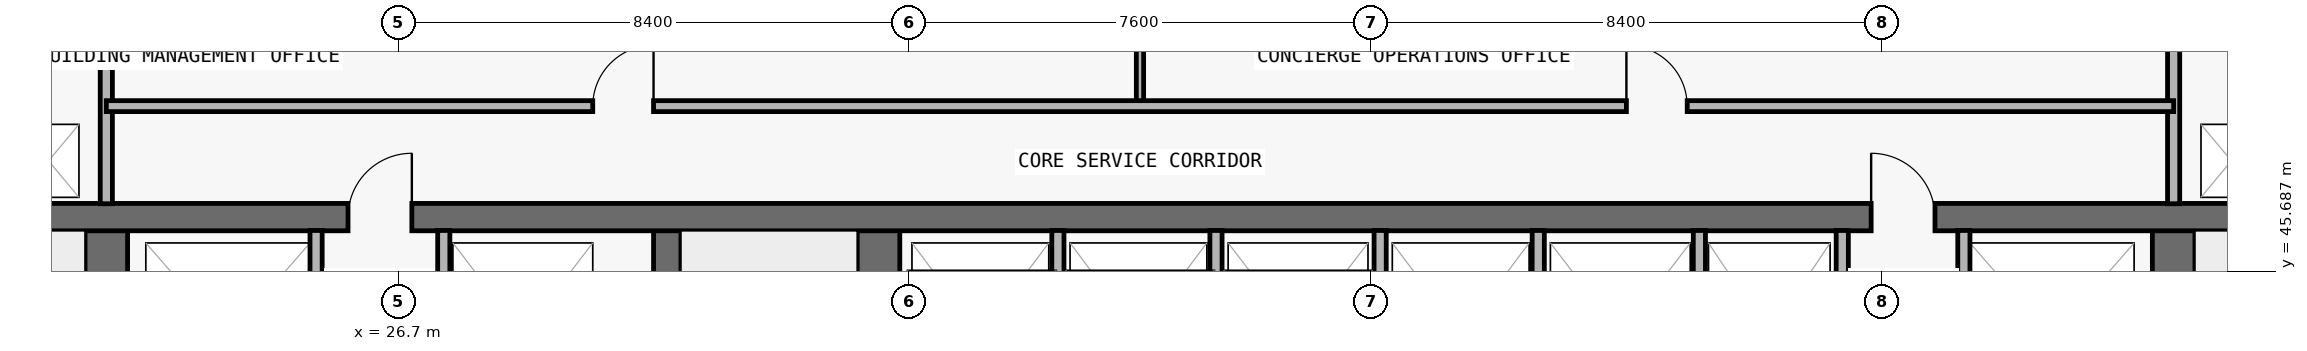
"""IFC4 building model, lengths in metres.
Left out: names, types, materials, properties, quantities, classifications, styles, units other than length and angle.
Written with IfcOpenShell. Run it as: python <this file> out.ifc"""

import sys

from ifc_helpers import new_model, si_unit, direction, frame, frame_2d, origin, place, context, subcontext, project, spatial, rectangle, extrude, element, fill, save


model = new_model("IFC4")
c1 = context("Model", 3, precision=1e-05, world=origin(), true_north=direction((0.0, 1.0)))
c2 = subcontext(c1, "Body", "Model", "MODEL_VIEW")
j1 = project(units=[si_unit("LENGTHUNIT", "METRE"), si_unit("PLANEANGLEUNIT", "RADIAN")], contexts=[c1])
p1 = place(None, origin())
s1 = spatial("IfcSite", under=j1, at=p1, CompositionType="ELEMENT")
p2 = place(p1, origin())
s2 = spatial("IfcBuilding", under=s1, at=p2, CompositionType="ELEMENT")
p3 = place(p2, frame((0.0, 0.0, 5.4)))
s3 = spatial("IfcBuildingStorey", under=s2, at=p3, CompositionType="ELEMENT", Elevation=5.4)
p4 = place(p3, frame((21.9, 36.9, 0.0), z_axis=(0.0, 0.0, 1.0), x_axis=(0.0, 1.0, 0.0)))
e1 = element("IfcWall", 1, at=p4, inside=s3, PredefinedType="SHEAR", context=c2, shape_type="SweptSolid", body=[
    extrude(rectangle(XDim=9.675, YDim=0.7, at=frame_2d((4.837, 0.0))), origin(), (0.0, 0.0, 1.0), 4.5),
])
p5 = place(p4, frame((0.65, 0.0, 0.0)))
e2 = element("IfcOpeningElement", 2, at=p5, cuts=e1, PredefinedType="OPENING", context=c2, shape_type="SweptSolid", body=[
    extrude(rectangle(XDim=1.1, YDim=2.15, at=frame_2d((0.55, 1.075))), frame((0.0, 0.36, 0.0), z_axis=(0.0, -1.0, 0.0), x_axis=(1.0, 0.0, 0.0)), (0.0, 0.0, 1.0), 0.72),
])
p6 = place(p3, frame((55.9, 36.9, 0.0), z_axis=(0.0, 0.0, 1.0), x_axis=(0.0, 1.0, 0.0)))
e3 = element("IfcWall", 3, at=p6, inside=s3, PredefinedType="SHEAR", context=c2, shape_type="SweptSolid", body=[
    extrude(rectangle(XDim=9.675, YDim=0.7, at=frame_2d((4.837, 0.0))), origin(), (0.0, 0.0, 1.0), 4.5),
])
p7 = place(p6, frame((0.65, 0.0, 0.0)))
e4 = element("IfcOpeningElement", 4, at=p7, cuts=e3, PredefinedType="OPENING", context=c2, shape_type="SweptSolid", body=[
    extrude(rectangle(XDim=1.1, YDim=2.15, at=frame_2d((0.55, 1.075))), frame((0.0, 0.36, 0.0), z_axis=(0.0, -1.0, 0.0), x_axis=(1.0, 0.0, 0.0)), (0.0, 0.0, 1.0), 0.72),
])
p8 = place(p3, frame((31.125, 36.9, 0.0), z_axis=(0.0, 0.0, 1.0), x_axis=(0.0, 1.0, 0.0)))
e5 = element("IfcWall", 5, at=p8, inside=s3, PredefinedType="SHEAR", context=c2, shape_type="SweptSolid", body=[
    extrude(rectangle(XDim=9.675, YDim=0.45, at=frame_2d((4.837, 0.0))), origin(), (0.0, 0.0, 1.0), 4.5),
])
p9 = place(p3, frame((34.6, 36.9, 0.0), z_axis=(0.0, 0.0, 1.0), x_axis=(0.0, 1.0, 0.0)))
e6 = element("IfcWall", 6, at=p9, inside=s3, PredefinedType="SHEAR", context=c2, shape_type="SweptSolid", body=[
    extrude(rectangle(XDim=9.675, YDim=0.7, at=frame_2d((4.837, 0.0))), origin(), (0.0, 0.0, 1.0), 4.5),
])
p10 = place(p3, frame((18.2, 46.575, 0.0), z_axis=(0.0, 0.0, 1.0), x_axis=(1.0, 0.0, 0.0)))
e7 = element("IfcWall", 7, at=p10, inside=s3, PredefinedType="SHEAR", context=c2, shape_type="SweptSolid", body=[
    extrude(rectangle(XDim=41.4, YDim=0.45, at=frame_2d((20.7, 0.0))), origin(), (0.0, 0.0, 1.0), 4.5),
])
p11 = place(p10, frame((7.675, 0.0, 0.0)))
e8 = element("IfcOpeningElement", 8, at=p11, cuts=e7, PredefinedType="OPENING", context=c2, shape_type="SweptSolid", body=[
    extrude(rectangle(XDim=1.05, YDim=2.15, at=frame_2d((0.525, 1.075))), frame((0.0, 0.235, 0.0), z_axis=(0.0, -1.0, 0.0), x_axis=(1.0, 0.0, 0.0)), (0.0, 0.0, 1.0), 0.47),
])
p12 = place(p10, frame((32.725, 0.0, 0.0)))
e9 = element("IfcOpeningElement", 9, at=p12, cuts=e7, PredefinedType="OPENING", context=c2, shape_type="SweptSolid", body=[
    extrude(rectangle(XDim=1.05, YDim=2.15, at=frame_2d((0.525, 1.075))), frame((0.0, 0.235, 0.0), z_axis=(0.0, -1.0, 0.0), x_axis=(1.0, 0.0, 0.0)), (0.0, 0.0, 1.0), 0.47),
])
p13 = place(p3, frame((21.9, 46.795, 0.0), z_axis=(0.0, 0.0, 1.0), x_axis=(0.0, 1.0, 0.0)))
e10 = element("IfcWall", 10, at=p13, inside=s3, PredefinedType="PARTITIONING", context=c2, shape_type="SweptSolid", body=[
    extrude(rectangle(XDim=2.91, YDim=0.2, at=frame_2d((1.455, 0.0))), origin(), (0.0, 0.0, 1.0), 4.5),
])
for number, where, z_axis, x_axis in (
    (11, (25.35, 43.17, 0.0), (0.0, 0.0, 1.0), (0.0, 1.0, 0.0)),
    (12, (27.45, 43.17, 0.0), (0.0, 0.0, 1.0), (0.0, 1.0, 0.0)),
    (13, (37.55, 43.17, 0.0), (0.0, 0.0, 1.0), (0.0, 1.0, 0.0)),
):
    element("IfcWall", number, at=place(p3, frame(where, z_axis=z_axis, x_axis=x_axis)), inside=s3, PredefinedType="PARTITIONING", context=c2, shape_type="SweptSolid", body=[
        extrude(rectangle(XDim=3.185, YDim=0.2, at=frame_2d((1.593, 0.0))), origin(), (0.0, 0.0, 1.0), 4.5),
    ])
p14 = place(p3, frame((38.9, 48.4, 0.0), z_axis=(0.0, 0.0, 1.0), x_axis=(0.0, 1.0, 0.0)))
e14 = element("IfcWall", 14, at=p14, inside=s3, PredefinedType="PARTITIONING", context=c2, shape_type="SweptSolid", body=[
    extrude(rectangle(XDim=1.305, YDim=0.12, at=frame_2d((0.653, 0.0))), origin(), (0.0, 0.0, 1.0), 4.5),
])
for number, where, z_axis, x_axis in (
    (15, (40.15, 43.17, 0.0), (0.0, 0.0, 1.0), (0.0, 1.0, 0.0)),
    (16, (42.85, 43.17, 0.0), (0.0, 0.0, 1.0), (0.0, 1.0, 0.0)),
    (17, (45.45, 43.17, 0.0), (0.0, 0.0, 1.0), (0.0, 1.0, 0.0)),
    (18, (48.1, 43.17, 0.0), (0.0, 0.0, 1.0), (0.0, 1.0, 0.0)),
    (19, (50.45, 43.17, 0.0), (0.0, 0.0, 1.0), (0.0, 1.0, 0.0)),
    (20, (52.45, 43.17, 0.0), (0.0, 0.0, 1.0), (0.0, 1.0, 0.0)),
):
    element("IfcWall", number, at=place(p3, frame(where, z_axis=z_axis, x_axis=x_axis)), inside=s3, PredefinedType="PARTITIONING", context=c2, shape_type="SweptSolid", body=[
        extrude(rectangle(XDim=3.185, YDim=0.2, at=frame_2d((1.593, 0.0))), origin(), (0.0, 0.0, 1.0), 4.5),
    ])
p15 = place(p3, frame((55.9, 46.795, 0.0), z_axis=(0.0, 0.0, 1.0), x_axis=(0.0, 1.0, 0.0)))
e21 = element("IfcWall", 21, at=p15, inside=s3, PredefinedType="PARTITIONING", context=c2, shape_type="SweptSolid", body=[
    extrude(rectangle(XDim=2.91, YDim=0.2, at=frame_2d((1.455, 0.0))), origin(), (0.0, 0.0, 1.0), 4.5),
])
p16 = place(p3, frame((21.9, 48.4, 0.0), z_axis=(0.0, 0.0, 1.0), x_axis=(1.0, 0.0, 0.0)))
e22 = element("IfcWall", 22, at=p16, inside=s3, PredefinedType="PARTITIONING", context=c2, shape_type="SweptSolid", body=[
    extrude(rectangle(XDim=34.0, YDim=0.18, at=frame_2d((17.0, 0.0))), origin(), (0.0, 0.0, 1.0), 4.5),
])
p17 = place(p16, frame((8.0, 0.0, 0.0)))
e23 = element("IfcOpeningElement", 23, at=p17, cuts=e22, PredefinedType="OPENING", context=c2, shape_type="SweptSolid", body=[
    extrude(rectangle(XDim=1.0, YDim=2.2, at=frame_2d((0.5, 1.1))), frame((0.0, 0.1, 0.0), z_axis=(0.0, -1.0, 0.0), x_axis=(1.0, 0.0, 0.0)), (0.0, 0.0, 1.0), 0.2),
])
p18 = place(p16, frame((25.0, 0.0, 0.0)))
e24 = element("IfcOpeningElement", 24, at=p18, cuts=e22, PredefinedType="OPENING", context=c2, shape_type="SweptSolid", body=[
    extrude(rectangle(XDim=1.0, YDim=2.2, at=frame_2d((0.5, 1.1))), frame((0.0, 0.1, 0.0), z_axis=(0.0, -1.0, 0.0), x_axis=(1.0, 0.0, 0.0)), (0.0, 0.0, 1.0), 0.2),
])
p19 = place(p11, origin())
e25 = element("IfcDoor", 25, at=p19, inside=s3, OperationType="SINGLE_SWING_RIGHT", PredefinedType="DOOR", context=c2, shape_type="SweptSolid", body=[
    extrude(rectangle(XDim=1.05, YDim=2.15, at=frame_2d((0.525, 1.075))), frame((0.0, 0.025, 0.0), z_axis=(0.0, -1.0, 0.0), x_axis=(1.0, 0.0, 0.0)), (0.0, 0.0, 1.0), 0.05),
])
fill(e8, e25)
p20 = place(p12, origin())
e26 = element("IfcDoor", 26, at=p20, inside=s3, OperationType="SINGLE_SWING_LEFT", PredefinedType="DOOR", context=c2, shape_type="SweptSolid", body=[
    extrude(rectangle(XDim=1.05, YDim=2.15, at=frame_2d((0.525, 1.075))), frame((0.0, 0.025, 0.0), z_axis=(0.0, -1.0, 0.0), x_axis=(1.0, 0.0, 0.0)), (0.0, 0.0, 1.0), 0.05),
])
fill(e9, e26)
p21 = place(p17, origin())
e27 = element("IfcDoor", 27, at=p21, inside=s3, OperationType="SINGLE_SWING_RIGHT", PredefinedType="DOOR", context=c2, shape_type="SweptSolid", body=[
    extrude(rectangle(XDim=1.0, YDim=2.2, at=frame_2d((0.5, 1.1))), frame((0.0, 0.025, 0.0), z_axis=(0.0, -1.0, 0.0), x_axis=(1.0, 0.0, 0.0)), (0.0, 0.0, 1.0), 0.05),
])
fill(e23, e27)
p22 = place(p18, origin())
e28 = element("IfcDoor", 28, at=p22, inside=s3, OperationType="SINGLE_SWING_LEFT", PredefinedType="DOOR", context=c2, shape_type="SweptSolid", body=[
    extrude(rectangle(XDim=1.0, YDim=2.2, at=frame_2d((0.5, 1.1))), frame((0.0, 0.025, 0.0), z_axis=(0.0, -1.0, 0.0), x_axis=(1.0, 0.0, 0.0)), (0.0, 0.0, 1.0), 0.05),
])
fill(e24, e28)
save(model, sys.argv[1])
